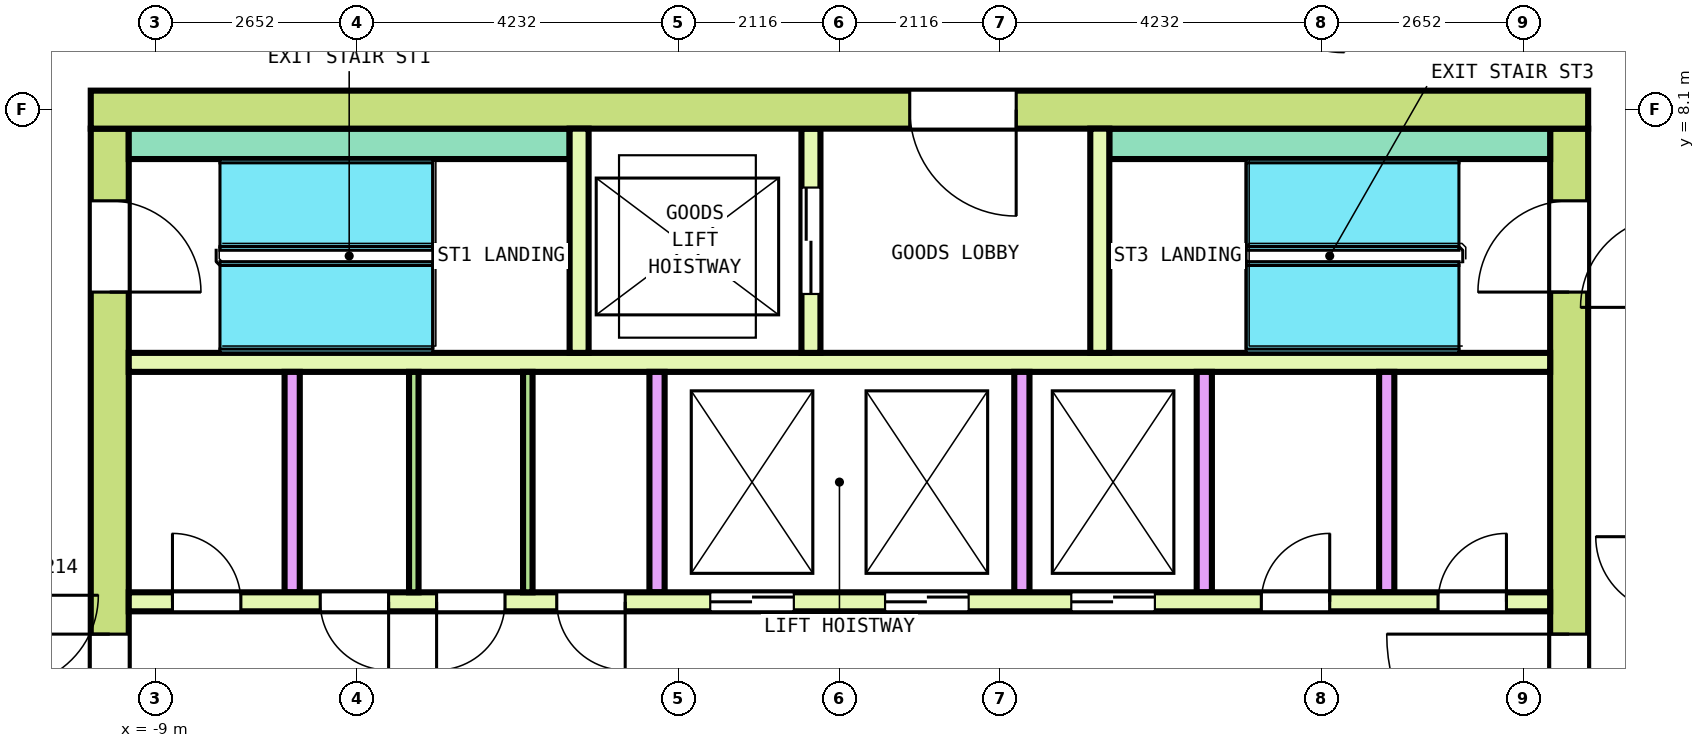
"""IFC4 building model, lengths in metres.
Left out: names, types, materials, properties, quantities, classifications, styles, units other than length and angle.
Written with IfcOpenShell. Run it as: python <this file> out.ifc"""

import sys

from ifc_helpers import new_model, si_unit, direction, frame, frame_2d, origin, place, context, subcontext, project, spatial, rectangle, extrude, element, fill, save


model = new_model("IFC4")
c1 = context("Model", 3, precision=1e-05, world=origin(), true_north=direction((0.0, 1.0)))
c2 = subcontext(c1, "Body", "Model", "MODEL_VIEW")
j1 = project(units=[si_unit("LENGTHUNIT", "METRE"), si_unit("PLANEANGLEUNIT", "RADIAN")], contexts=[c1])
p1 = place(None, origin())
s1 = spatial("IfcSite", under=j1, at=p1, CompositionType="ELEMENT")
p2 = place(p1, origin())
s2 = spatial("IfcBuilding", under=s1, at=p2, CompositionType="ELEMENT")
p3 = place(p2, frame((0.0, 0.0, 287.0)))
s3 = spatial("IfcBuildingStorey", under=s2, at=p3, CompositionType="ELEMENT", Elevation=287.0)
p4 = place(p3, frame((-9.85, 8.1, 0.0), z_axis=(0.0, 0.0, 1.0), x_axis=(1.0, 0.0, 0.0)))
e1 = element("IfcWall", 1, at=p4, inside=s3, PredefinedType="SHEAR", context=c2, shape_type="SweptSolid", body=[
    extrude(rectangle(XDim=19.7, YDim=0.5, at=frame_2d((9.85, 0.0))), origin(), (0.0, 0.0, 1.0), 3.7),
])
p5 = place(p4, frame((10.775, 0.0, 0.0)))
e2 = element("IfcOpeningElement", 2, at=p5, cuts=e1, PredefinedType="OPENING", context=c2, shape_type="SweptSolid", body=[
    extrude(rectangle(XDim=1.4, YDim=2.1, at=frame_2d((0.7, 1.05))), frame((0.0, 0.26, 0.0), z_axis=(0.0, -1.0, 0.0), x_axis=(1.0, 0.0, 0.0)), (0.0, 0.0, 1.0), 0.52),
])
p6 = place(p3, frame((-9.6, -7.85, 0.0), z_axis=(0.0, 0.0, 1.0), x_axis=(0.0, 1.0, 0.0)))
e3 = element("IfcWall", 3, at=p6, inside=s3, PredefinedType="SHEAR", context=c2, shape_type="SweptSolid", body=[
    extrude(rectangle(XDim=15.7, YDim=0.5, at=frame_2d((7.85, 0.0))), origin(), (0.0, 0.0, 1.0), 3.7),
])
p7 = place(p6, frame((6.65, 0.0, 0.0)))
e4 = element("IfcOpeningElement", 4, at=p7, cuts=e3, PredefinedType="OPENING", context=c2, shape_type="SweptSolid", body=[
    extrude(rectangle(XDim=2.4, YDim=2.1, at=frame_2d((1.2, 1.05))), frame((0.0, 0.26, 0.0), z_axis=(0.0, -1.0, 0.0), x_axis=(1.0, 0.0, 0.0)), (0.0, 0.0, 1.0), 0.52),
])
p8 = place(p6, frame((13.55, 0.0, 0.0)))
e5 = element("IfcOpeningElement", 5, at=p8, cuts=e3, PredefinedType="OPENING", context=c2, shape_type="SweptSolid", body=[
    extrude(rectangle(XDim=1.2, YDim=2.1, at=frame_2d((0.6, 1.05))), frame((0.0, 0.26, 0.0), z_axis=(0.0, -1.0, 0.0), x_axis=(1.0, 0.0, 0.0)), (0.0, 0.0, 1.0), 0.52),
])
p9 = place(p6, frame((0.95, 0.0, 0.0)))
e6 = element("IfcOpeningElement", 6, at=p9, cuts=e3, PredefinedType="OPENING", context=c2, shape_type="SweptSolid", body=[
    extrude(rectangle(XDim=1.2, YDim=2.1, at=frame_2d((0.6, 1.05))), frame((0.0, 0.26, 0.0), z_axis=(0.0, -1.0, 0.0), x_axis=(1.0, 0.0, 0.0)), (0.0, 0.0, 1.0), 0.52),
])
p10 = place(p3, frame((9.6, -7.85, 0.0), z_axis=(0.0, 0.0, 1.0), x_axis=(0.0, 1.0, 0.0)))
e7 = element("IfcWall", 7, at=p10, inside=s3, PredefinedType="SHEAR", context=c2, shape_type="SweptSolid", body=[
    extrude(rectangle(XDim=15.7, YDim=0.5, at=frame_2d((7.85, 0.0))), origin(), (0.0, 0.0, 1.0), 3.7),
])
p11 = place(p10, frame((6.65, 0.0, 0.0)))
e8 = element("IfcOpeningElement", 8, at=p11, cuts=e7, PredefinedType="OPENING", context=c2, shape_type="SweptSolid", body=[
    extrude(rectangle(XDim=2.4, YDim=2.1, at=frame_2d((1.2, 1.05))), frame((0.0, 0.26, 0.0), z_axis=(0.0, -1.0, 0.0), x_axis=(1.0, 0.0, 0.0)), (0.0, 0.0, 1.0), 0.52),
])
p12 = place(p10, frame((13.55, 0.0, 0.0)))
e9 = element("IfcOpeningElement", 9, at=p12, cuts=e7, PredefinedType="OPENING", context=c2, shape_type="SweptSolid", body=[
    extrude(rectangle(XDim=1.2, YDim=2.1, at=frame_2d((0.6, 1.05))), frame((0.0, 0.26, 0.0), z_axis=(0.0, -1.0, 0.0), x_axis=(1.0, 0.0, 0.0)), (0.0, 0.0, 1.0), 0.52),
])
p13 = place(p10, frame((1.05, 0.0, 0.0)))
e10 = element("IfcOpeningElement", 10, at=p13, cuts=e7, PredefinedType="OPENING", context=c2, shape_type="SweptSolid", body=[
    extrude(rectangle(XDim=1.0, YDim=2.1, at=frame_2d((0.5, 1.05))), frame((0.0, 0.26, 0.0), z_axis=(0.0, -1.0, 0.0), x_axis=(1.0, 0.0, 0.0)), (0.0, 0.0, 1.0), 0.52),
])
p14 = place(p3, frame((-9.35, 1.625, 0.0), z_axis=(0.0, 0.0, 1.0), x_axis=(1.0, 0.0, 0.0)))
e11 = element("IfcWall", 11, at=p14, inside=s3, PredefinedType="SOLIDWALL", context=c2, shape_type="SweptSolid", body=[
    extrude(rectangle(XDim=18.7, YDim=0.25, at=frame_2d((9.35, 0.0))), origin(), (0.0, 0.0, 1.0), 3.7),
])
p15 = place(p14, frame((7.65, 0.0, 0.0)))
e12 = element("IfcOpeningElement", 12, at=p15, cuts=e11, PredefinedType="OPENING", context=c2, shape_type="SweptSolid", body=[
    extrude(rectangle(XDim=1.1, YDim=2.1, at=frame_2d((0.55, 1.05))), frame((0.0, 0.135, 0.0), z_axis=(0.0, -1.0, 0.0), x_axis=(1.0, 0.0, 0.0)), (0.0, 0.0, 1.0), 0.27),
])
p16 = place(p14, frame((9.95, 0.0, 0.0)))
e13 = element("IfcOpeningElement", 13, at=p16, cuts=e11, PredefinedType="OPENING", context=c2, shape_type="SweptSolid", body=[
    extrude(rectangle(XDim=1.1, YDim=2.1, at=frame_2d((0.55, 1.05))), frame((0.0, 0.135, 0.0), z_axis=(0.0, -1.0, 0.0), x_axis=(1.0, 0.0, 0.0)), (0.0, 0.0, 1.0), 0.27),
])
p17 = place(p14, frame((12.4, 0.0, 0.0)))
e14 = element("IfcOpeningElement", 14, at=p17, cuts=e11, PredefinedType="OPENING", context=c2, shape_type="SweptSolid", body=[
    extrude(rectangle(XDim=1.1, YDim=2.1, at=frame_2d((0.55, 1.05))), frame((0.0, 0.135, 0.0), z_axis=(0.0, -1.0, 0.0), x_axis=(1.0, 0.0, 0.0)), (0.0, 0.0, 1.0), 0.27),
])
p18 = place(p14, frame((0.575, 0.0, 0.0)))
e15 = element("IfcOpeningElement", 15, at=p18, cuts=e11, PredefinedType="OPENING", context=c2, shape_type="SweptSolid", body=[
    extrude(rectangle(XDim=0.9, YDim=2.1, at=frame_2d((0.45, 1.05))), frame((0.0, 0.135, 0.0), z_axis=(0.0, -1.0, 0.0), x_axis=(1.0, 0.0, 0.0)), (0.0, 0.0, 1.0), 0.27),
])
p19 = place(p14, frame((2.519, 0.0, 0.0)))
e16 = element("IfcOpeningElement", 16, at=p19, cuts=e11, PredefinedType="OPENING", context=c2, shape_type="SweptSolid", body=[
    extrude(rectangle(XDim=0.9, YDim=2.1, at=frame_2d((0.45, 1.05))), frame((0.0, 0.135, 0.0), z_axis=(0.0, -1.0, 0.0), x_axis=(1.0, 0.0, 0.0)), (0.0, 0.0, 1.0), 0.27),
])
p20 = place(p14, frame((4.05, 0.0, 0.0)))
e17 = element("IfcOpeningElement", 17, at=p20, cuts=e11, PredefinedType="OPENING", context=c2, shape_type="SweptSolid", body=[
    extrude(rectangle(XDim=0.9, YDim=2.1, at=frame_2d((0.45, 1.05))), frame((0.0, 0.135, 0.0), z_axis=(0.0, -1.0, 0.0), x_axis=(1.0, 0.0, 0.0)), (0.0, 0.0, 1.0), 0.27),
])
p21 = place(p14, frame((5.631, 0.0, 0.0)))
e18 = element("IfcOpeningElement", 18, at=p21, cuts=e11, PredefinedType="OPENING", context=c2, shape_type="SweptSolid", body=[
    extrude(rectangle(XDim=0.9, YDim=2.1, at=frame_2d((0.45, 1.05))), frame((0.0, 0.135, 0.0), z_axis=(0.0, -1.0, 0.0), x_axis=(1.0, 0.0, 0.0)), (0.0, 0.0, 1.0), 0.27),
])
p22 = place(p14, frame((14.9, 0.0, 0.0)))
e19 = element("IfcOpeningElement", 19, at=p22, cuts=e11, PredefinedType="OPENING", context=c2, shape_type="SweptSolid", body=[
    extrude(rectangle(XDim=0.9, YDim=2.1, at=frame_2d((0.45, 1.05))), frame((0.0, 0.135, 0.0), z_axis=(0.0, -1.0, 0.0), x_axis=(1.0, 0.0, 0.0)), (0.0, 0.0, 1.0), 0.27),
])
p23 = place(p14, frame((17.225, 0.0, 0.0)))
e20 = element("IfcOpeningElement", 20, at=p23, cuts=e11, PredefinedType="OPENING", context=c2, shape_type="SweptSolid", body=[
    extrude(rectangle(XDim=0.9, YDim=2.1, at=frame_2d((0.45, 1.05))), frame((0.0, 0.135, 0.0), z_axis=(0.0, -1.0, 0.0), x_axis=(1.0, 0.0, 0.0)), (0.0, 0.0, 1.0), 0.27),
])
p24 = place(p3, frame((-9.35, 4.775, 0.0), z_axis=(0.0, 0.0, 1.0), x_axis=(1.0, 0.0, 0.0)))
e21 = element("IfcWall", 21, at=p24, inside=s3, PredefinedType="SOLIDWALL", context=c2, shape_type="SweptSolid", body=[
    extrude(rectangle(XDim=18.7, YDim=0.25, at=frame_2d((9.35, 0.0))), origin(), (0.0, 0.0, 1.0), 3.7),
])
for number, where, z_axis, x_axis in (
    (22, (-7.2, 1.75, 0.0), (0.0, 0.0, 1.0), (0.0, 1.0, 0.0)),
    (23, (-2.4, 1.75, 0.0), (0.0, 0.0, 1.0), (0.0, 1.0, 0.0)),
    (24, (2.4, 1.75, 0.0), (0.0, 0.0, 1.0), (0.0, 1.0, 0.0)),
    (25, (4.8, 1.75, 0.0), (0.0, 0.0, 1.0), (0.0, 1.0, 0.0)),
    (26, (7.2, 1.75, 0.0), (0.0, 0.0, 1.0), (0.0, 1.0, 0.0)),
):
    element("IfcWall", number, at=place(p3, frame(where, z_axis=z_axis, x_axis=x_axis)), inside=s3, PredefinedType="SOLIDWALL", context=c2, shape_type="SweptSolid", body=[
        extrude(rectangle(XDim=2.9, YDim=0.2, at=frame_2d((1.45, 0.0))), origin(), (0.0, 0.0, 1.0), 3.7),
    ])
for number, where, z_axis, x_axis in (
    (27, (-9.35, 7.65, 0.0), (0.0, 0.0, 1.0), (1.0, 0.0, 0.0)),
    (28, (3.55, 7.65, 0.0), (0.0, 0.0, 1.0), (1.0, 0.0, 0.0)),
):
    element("IfcWall", number, at=place(p3, frame(where, z_axis=z_axis, x_axis=x_axis)), inside=s3, PredefinedType="SOLIDWALL", context=c2, shape_type="SweptSolid", body=[
        extrude(rectangle(XDim=5.8, YDim=0.4, at=frame_2d((2.9, 0.0))), origin(), (0.0, 0.0, 1.0), 3.7),
    ])
p25 = place(p3, frame((-3.425, 4.9, 0.0), z_axis=(0.0, 0.0, 1.0), x_axis=(0.0, 1.0, 0.0)))
e29 = element("IfcWall", 29, at=p25, inside=s3, PredefinedType="SOLIDWALL", context=c2, shape_type="SweptSolid", body=[
    extrude(rectangle(XDim=2.95, YDim=0.25, at=frame_2d((1.475, 0.0))), origin(), (0.0, 0.0, 1.0), 3.7),
])
p26 = place(p3, frame((-0.375, 4.9, 0.0), z_axis=(0.0, 0.0, 1.0), x_axis=(0.0, 1.0, 0.0)))
e30 = element("IfcWall", 30, at=p26, inside=s3, PredefinedType="SOLIDWALL", context=c2, shape_type="SweptSolid", body=[
    extrude(rectangle(XDim=2.95, YDim=0.25, at=frame_2d((1.475, 0.0))), origin(), (0.0, 0.0, 1.0), 3.7),
])
p27 = place(p26, frame((0.775, 0.0, 0.0)))
e31 = element("IfcOpeningElement", 31, at=p27, cuts=e30, PredefinedType="OPENING", context=c2, shape_type="SweptSolid", body=[
    extrude(rectangle(XDim=1.4, YDim=2.1, at=frame_2d((0.7, 1.05))), frame((0.0, 0.135, 0.0), z_axis=(0.0, -1.0, 0.0), x_axis=(1.0, 0.0, 0.0)), (0.0, 0.0, 1.0), 0.27),
])
p28 = place(p3, frame((3.425, 4.9, 0.0), z_axis=(0.0, 0.0, 1.0), x_axis=(0.0, 1.0, 0.0)))
e32 = element("IfcWall", 32, at=p28, inside=s3, PredefinedType="SOLIDWALL", context=c2, shape_type="SweptSolid", body=[
    extrude(rectangle(XDim=2.95, YDim=0.25, at=frame_2d((1.475, 0.0))), origin(), (0.0, 0.0, 1.0), 3.7),
])
for number, where, z_axis, x_axis in (
    (33, (-5.6, 1.75, 0.0), (0.0, 0.0, 1.0), (0.0, 1.0, 0.0)),
    (34, (-4.1, 1.75, 0.0), (0.0, 0.0, 1.0), (0.0, 1.0, 0.0)),
):
    element("IfcWall", number, at=place(p3, frame(where, z_axis=z_axis, x_axis=x_axis)), inside=s3, PredefinedType="PARTITIONING", context=c2, shape_type="SweptSolid", body=[
        extrude(rectangle(XDim=2.9, YDim=0.125, at=frame_2d((1.45, 0.0))), origin(), (0.0, 0.0, 1.0), 3.7),
    ])
p29 = place(p15, origin())
e35 = element("IfcDoor", 35, at=p29, inside=s3, OperationType="DOUBLE_DOOR_SLIDING", PredefinedType="DOOR", context=c2, shape_type="SweptSolid", body=[
    extrude(rectangle(XDim=1.1, YDim=2.1, at=frame_2d((0.55, 1.05))), frame((0.0, 0.075, 0.0), z_axis=(0.0, -1.0, 0.0), x_axis=(1.0, 0.0, 0.0)), (0.0, 0.0, 1.0), 0.15),
])
fill(e12, e35)
p30 = place(p16, origin())
e36 = element("IfcDoor", 36, at=p30, inside=s3, OperationType="DOUBLE_DOOR_SLIDING", PredefinedType="DOOR", context=c2, shape_type="SweptSolid", body=[
    extrude(rectangle(XDim=1.1, YDim=2.1, at=frame_2d((0.55, 1.05))), frame((0.0, 0.075, 0.0), z_axis=(0.0, -1.0, 0.0), x_axis=(1.0, 0.0, 0.0)), (0.0, 0.0, 1.0), 0.15),
])
fill(e13, e36)
p31 = place(p17, origin())
e37 = element("IfcDoor", 37, at=p31, inside=s3, OperationType="DOUBLE_DOOR_SLIDING", PredefinedType="DOOR", context=c2, shape_type="SweptSolid", body=[
    extrude(rectangle(XDim=1.1, YDim=2.1, at=frame_2d((0.55, 1.05))), frame((0.0, 0.075, 0.0), z_axis=(0.0, -1.0, 0.0), x_axis=(1.0, 0.0, 0.0)), (0.0, 0.0, 1.0), 0.15),
])
fill(e14, e37)
p32 = place(p27, origin())
e38 = element("IfcDoor", 38, at=p32, inside=s3, OperationType="DOUBLE_DOOR_SLIDING", PredefinedType="DOOR", context=c2, shape_type="SweptSolid", body=[
    extrude(rectangle(XDim=1.4, YDim=2.1, at=frame_2d((0.7, 1.05))), frame((0.0, 0.075, 0.0), z_axis=(0.0, -1.0, 0.0), x_axis=(1.0, 0.0, 0.0)), (0.0, 0.0, 1.0), 0.15),
])
fill(e31, e38)
p33 = place(p7, origin())
e39 = element("IfcDoor", 39, at=p33, inside=s3, OperationType="DOUBLE_DOOR_SINGLE_SWING", PredefinedType="DOOR", context=c2, shape_type="SweptSolid", body=[
    extrude(rectangle(XDim=2.4, YDim=2.1, at=frame_2d((1.2, 1.05))), frame((0.0, 0.2, 0.0), z_axis=(0.0, -1.0, 0.0), x_axis=(1.0, 0.0, 0.0)), (0.0, 0.0, 1.0), 0.4),
])
fill(e4, e39)
p34 = place(p11, origin())
e40 = element("IfcDoor", 40, at=p34, inside=s3, OperationType="DOUBLE_DOOR_SINGLE_SWING", PredefinedType="DOOR", context=c2, shape_type="SweptSolid", body=[
    extrude(rectangle(XDim=2.4, YDim=2.1, at=frame_2d((1.2, 1.05))), frame((0.0, 0.2, 0.0), z_axis=(0.0, -1.0, 0.0), x_axis=(1.0, 0.0, 0.0)), (0.0, 0.0, 1.0), 0.4),
])
fill(e8, e40)
p35 = place(p8, origin())
e41 = element("IfcDoor", 41, at=p35, inside=s3, OperationType="SINGLE_SWING_RIGHT", PredefinedType="DOOR", context=c2, shape_type="SweptSolid", body=[
    extrude(rectangle(XDim=1.2, YDim=2.1, at=frame_2d((0.6, 1.05))), frame((0.0, 0.2, 0.0), z_axis=(0.0, -1.0, 0.0), x_axis=(1.0, 0.0, 0.0)), (0.0, 0.0, 1.0), 0.4),
])
fill(e5, e41)
p36 = place(p12, origin())
e42 = element("IfcDoor", 42, at=p36, inside=s3, OperationType="SINGLE_SWING_RIGHT", PredefinedType="DOOR", context=c2, shape_type="SweptSolid", body=[
    extrude(rectangle(XDim=1.2, YDim=2.1, at=frame_2d((0.6, 1.05))), frame((0.0, 0.2, 0.0), z_axis=(0.0, -1.0, 0.0), x_axis=(1.0, 0.0, 0.0)), (0.0, 0.0, 1.0), 0.4),
])
fill(e9, e42)
p37 = place(p5, origin())
e43 = element("IfcDoor", 43, at=p37, inside=s3, OperationType="DOUBLE_DOOR_SINGLE_SWING", PredefinedType="DOOR", context=c2, shape_type="SweptSolid", body=[
    extrude(rectangle(XDim=1.4, YDim=2.1, at=frame_2d((0.7, 1.05))), frame((0.0, 0.2, 0.0), z_axis=(0.0, -1.0, 0.0), x_axis=(1.0, 0.0, 0.0)), (0.0, 0.0, 1.0), 0.4),
])
fill(e2, e43)
p38 = place(p18, origin())
e44 = element("IfcDoor", 44, at=p38, inside=s3, OperationType="SINGLE_SWING_RIGHT", PredefinedType="DOOR", context=c2, shape_type="SweptSolid", body=[
    extrude(rectangle(XDim=0.9, YDim=2.1, at=frame_2d((0.45, 1.05))), frame((0.0, 0.075, 0.0), z_axis=(0.0, -1.0, 0.0), x_axis=(1.0, 0.0, 0.0)), (0.0, 0.0, 1.0), 0.15),
])
fill(e15, e44)
p39 = place(p19, origin())
e45 = element("IfcDoor", 45, at=p39, inside=s3, OperationType="SINGLE_SWING_LEFT", PredefinedType="DOOR", context=c2, shape_type="SweptSolid", body=[
    extrude(rectangle(XDim=0.9, YDim=2.1, at=frame_2d((0.45, 1.05))), frame((0.0, 0.075, 0.0), z_axis=(0.0, -1.0, 0.0), x_axis=(1.0, 0.0, 0.0)), (0.0, 0.0, 1.0), 0.15),
])
fill(e16, e45)
p40 = place(p20, origin())
e46 = element("IfcDoor", 46, at=p40, inside=s3, OperationType="SINGLE_SWING_RIGHT", PredefinedType="DOOR", context=c2, shape_type="SweptSolid", body=[
    extrude(rectangle(XDim=0.9, YDim=2.1, at=frame_2d((0.45, 1.05))), frame((0.0, 0.075, 0.0), z_axis=(0.0, -1.0, 0.0), x_axis=(1.0, 0.0, 0.0)), (0.0, 0.0, 1.0), 0.15),
])
fill(e17, e46)
p41 = place(p21, origin())
e47 = element("IfcDoor", 47, at=p41, inside=s3, OperationType="SINGLE_SWING_LEFT", PredefinedType="DOOR", context=c2, shape_type="SweptSolid", body=[
    extrude(rectangle(XDim=0.9, YDim=2.1, at=frame_2d((0.45, 1.05))), frame((0.0, 0.075, 0.0), z_axis=(0.0, -1.0, 0.0), x_axis=(1.0, 0.0, 0.0)), (0.0, 0.0, 1.0), 0.15),
])
fill(e18, e47)
p42 = place(p22, origin())
e48 = element("IfcDoor", 48, at=p42, inside=s3, OperationType="SINGLE_SWING_RIGHT", PredefinedType="DOOR", context=c2, shape_type="SweptSolid", body=[
    extrude(rectangle(XDim=0.9, YDim=2.1, at=frame_2d((0.45, 1.05))), frame((0.0, 0.075, 0.0), z_axis=(0.0, -1.0, 0.0), x_axis=(1.0, 0.0, 0.0)), (0.0, 0.0, 1.0), 0.15),
])
fill(e19, e48)
p43 = place(p23, origin())
e49 = element("IfcDoor", 49, at=p43, inside=s3, OperationType="SINGLE_SWING_LEFT", PredefinedType="DOOR", context=c2, shape_type="SweptSolid", body=[
    extrude(rectangle(XDim=0.9, YDim=2.1, at=frame_2d((0.45, 1.05))), frame((0.0, 0.075, 0.0), z_axis=(0.0, -1.0, 0.0), x_axis=(1.0, 0.0, 0.0)), (0.0, 0.0, 1.0), 0.15),
])
fill(e20, e49)
save(model, sys.argv[1])
